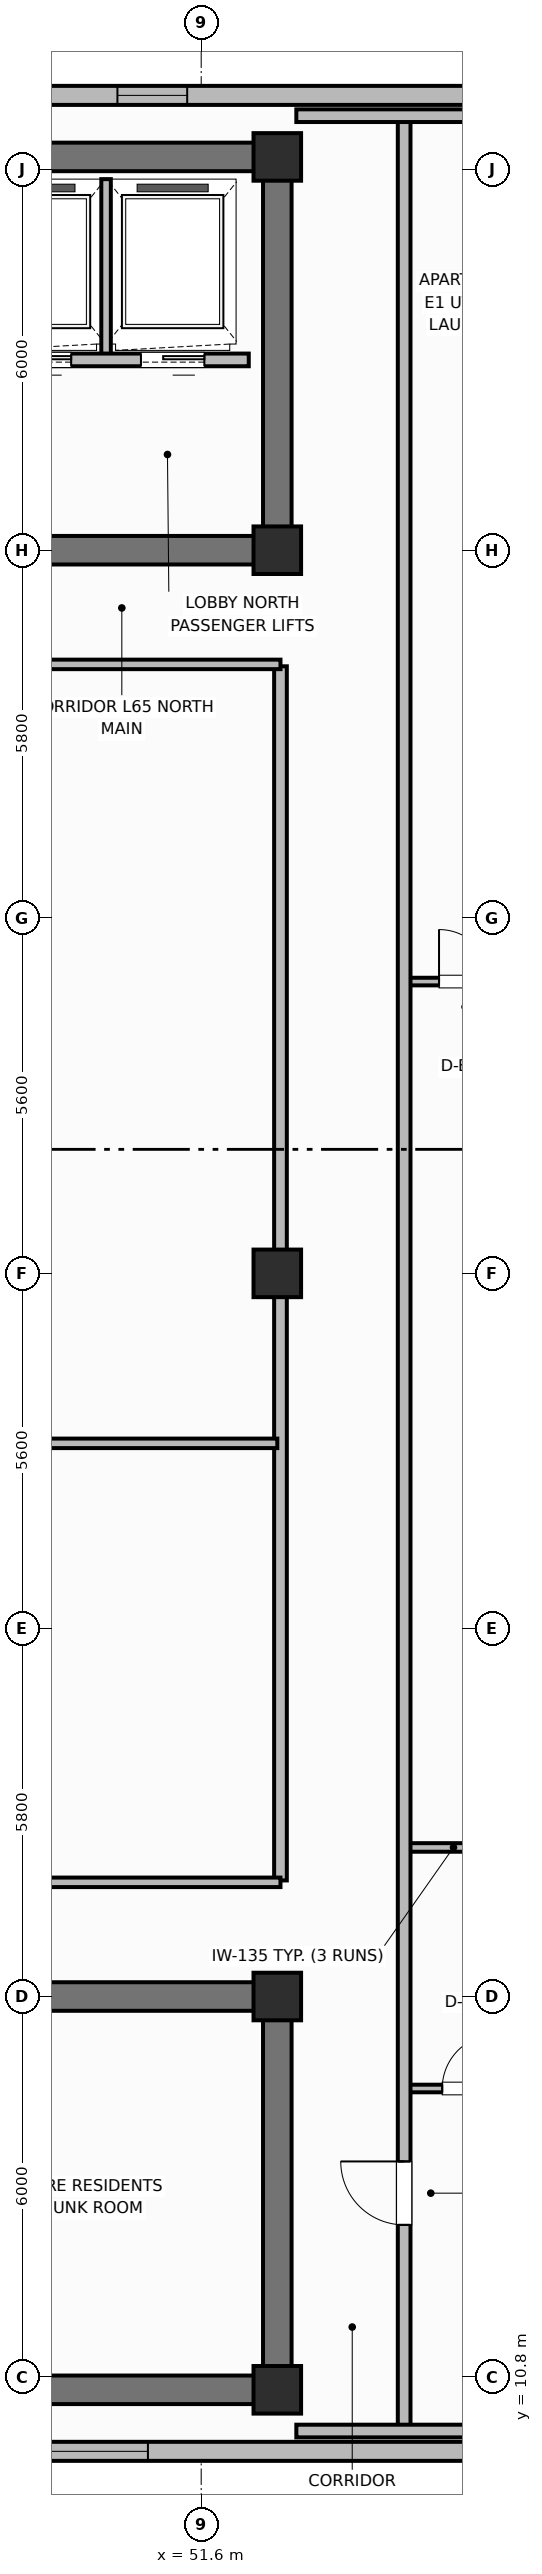
"""IFC4 building model, lengths in metres.
Left out: names, types, materials, properties, quantities, classifications, styles, units other than length and angle.
Written with IfcOpenShell. Run it as: python <this file> out.ifc"""

import sys

from ifc_helpers import new_model, si_unit, direction, frame, frame_2d, origin, origin_2d, place, context, subcontext, project, spatial, rectangle, extrude, element, fill, save


model = new_model("IFC4")
c1 = context("Model", 3, precision=1e-05, world=origin(), true_north=direction((0.0, 1.0)))
c2 = subcontext(c1, "Body", "Model", "MODEL_VIEW")
j1 = project(units=[si_unit("LENGTHUNIT", "METRE"), si_unit("PLANEANGLEUNIT", "RADIAN")], contexts=[c1])
p1 = place(None, origin())
s1 = spatial("IfcSite", under=j1, at=p1, CompositionType="ELEMENT")
p2 = place(p1, origin())
s2 = spatial("IfcBuilding", under=s1, at=p2, CompositionType="ELEMENT")
p3 = place(p2, frame((0.0, 0.0, 260.2)))
s3 = spatial("IfcBuildingStorey", under=s2, at=p3, CompositionType="ELEMENT", Elevation=260.2)
p4 = place(p3, frame((52.8, 10.6, 0.0), z_axis=(0.0, 0.0, 1.0), x_axis=(-1.0, 0.0, 0.0)))
e1 = element("IfcWall", 1, at=p4, inside=s3, PredefinedType="SHEAR", context=c2, shape_type="SweptSolid", body=[
    extrude(rectangle(XDim=27.2, YDim=0.45, at=frame_2d((13.6, 0.0))), origin(), (0.0, 0.0, 1.0), 3.7),
])
p5 = place(p3, frame((52.8, 10.825, 0.0), z_axis=(0.0, 0.0, 1.0), x_axis=(0.0, 1.0, 0.0)))
e2 = element("IfcWall", 2, at=p5, inside=s3, PredefinedType="SHEAR", context=c2, shape_type="SweptSolid", body=[
    extrude(rectangle(XDim=5.75, YDim=0.45, at=frame_2d((2.875, 0.0))), origin(), (0.0, 0.0, 1.0), 3.7),
])
p6 = place(p3, frame((25.6, 16.8, 0.0), z_axis=(0.0, 0.0, 1.0), x_axis=(1.0, 0.0, 0.0)))
e3 = element("IfcWall", 3, at=p6, inside=s3, PredefinedType="SHEAR", context=c2, shape_type="SweptSolid", body=[
    extrude(rectangle(XDim=27.2, YDim=0.45, at=frame_2d((13.6, 0.0))), origin(), (0.0, 0.0, 1.0), 3.7),
])
p7 = place(p6, frame((1.9, 0.0, 0.0)))
e4 = element("IfcOpeningElement", 4, at=p7, cuts=e3, PredefinedType="OPENING", context=c2, shape_type="SweptSolid", body=[
    extrude(rectangle(XDim=1.1, YDim=2.15, at=frame_2d((0.55, 1.075))), frame((0.0, 0.235, 0.0), z_axis=(0.0, -1.0, 0.0), x_axis=(1.0, 0.0, 0.0)), (0.0, 0.0, 1.0), 0.47),
])
p8 = place(p6, frame((13.0, 0.0, 0.0)))
e5 = element("IfcOpeningElement", 5, at=p8, cuts=e3, PredefinedType="OPENING", context=c2, shape_type="SweptSolid", body=[
    extrude(rectangle(XDim=1.2, YDim=2.15, at=frame_2d((0.6, 1.075))), frame((0.0, 0.235, 0.0), z_axis=(0.0, -1.0, 0.0), x_axis=(1.0, 0.0, 0.0)), (0.0, 0.0, 1.0), 0.47),
])
p9 = place(p6, frame((21.6, 0.0, 0.0)))
e6 = element("IfcOpeningElement", 6, at=p9, cuts=e3, PredefinedType="OPENING", context=c2, shape_type="SweptSolid", body=[
    extrude(rectangle(XDim=1.0, YDim=2.15, at=frame_2d((0.5, 1.075))), frame((0.0, 0.235, 0.0), z_axis=(0.0, -1.0, 0.0), x_axis=(1.0, 0.0, 0.0)), (0.0, 0.0, 1.0), 0.47),
])
p10 = place(p3, frame((25.6, 45.8, 0.0), z_axis=(0.0, 0.0, 1.0), x_axis=(1.0, 0.0, 0.0)))
e7 = element("IfcWall", 7, at=p10, inside=s3, PredefinedType="SHEAR", context=c2, shape_type="SweptSolid", body=[
    extrude(rectangle(XDim=27.2, YDim=0.45, at=frame_2d((13.6, 0.0))), origin(), (0.0, 0.0, 1.0), 3.7),
])
p11 = place(p3, frame((52.8, 39.825, 0.0), z_axis=(0.0, 0.0, 1.0), x_axis=(0.0, 1.0, 0.0)))
e8 = element("IfcWall", 8, at=p11, inside=s3, PredefinedType="SHEAR", context=c2, shape_type="SweptSolid", body=[
    extrude(rectangle(XDim=5.75, YDim=0.45, at=frame_2d((2.875, 0.0))), origin(), (0.0, 0.0, 1.0), 3.7),
])
p12 = place(p3, frame((52.8, 39.6, 0.0), z_axis=(0.0, 0.0, 1.0), x_axis=(-1.0, 0.0, 0.0)))
e9 = element("IfcWall", 9, at=p12, inside=s3, PredefinedType="SHEAR", context=c2, shape_type="SweptSolid", body=[
    extrude(rectangle(XDim=27.2, YDim=0.45, at=frame_2d((13.6, 0.0))), origin(), (0.0, 0.0, 1.0), 3.7),
])
p13 = place(p12, frame((24.2, 0.0, 0.0)))
e10 = element("IfcOpeningElement", 10, at=p13, cuts=e9, PredefinedType="OPENING", context=c2, shape_type="SweptSolid", body=[
    extrude(rectangle(XDim=1.1, YDim=2.15, at=frame_2d((0.55, 1.075))), frame((0.0, 0.235, 0.0), z_axis=(0.0, -1.0, 0.0), x_axis=(1.0, 0.0, 0.0)), (0.0, 0.0, 1.0), 0.47),
])
p14 = place(p12, frame((15.1, 0.0, 0.0)))
e11 = element("IfcOpeningElement", 11, at=p14, cuts=e9, PredefinedType="OPENING", context=c2, shape_type="SweptSolid", body=[
    extrude(rectangle(XDim=1.2, YDim=2.15, at=frame_2d((0.6, 1.075))), frame((0.0, 0.235, 0.0), z_axis=(0.0, -1.0, 0.0), x_axis=(1.0, 0.0, 0.0)), (0.0, 0.0, 1.0), 0.47),
])
p15 = place(p12, frame((11.6, 0.0, 0.0)))
e12 = element("IfcOpeningElement", 12, at=p15, cuts=e9, PredefinedType="OPENING", context=c2, shape_type="SweptSolid", body=[
    extrude(rectangle(XDim=0.9, YDim=2.1, at=frame_2d((0.45, 1.05))), frame((0.0, 0.235, 0.0), z_axis=(0.0, -1.0, 0.0), x_axis=(1.0, 0.0, 0.0)), (0.0, 0.0, 1.0), 0.47),
])
p16 = place(p12, frame((7.35, 0.0, 0.0)))
e13 = element("IfcOpeningElement", 13, at=p16, cuts=e9, PredefinedType="OPENING", context=c2, shape_type="SweptSolid", body=[
    extrude(rectangle(XDim=0.85, YDim=2.1, at=frame_2d((0.425, 1.05))), frame((0.0, 0.235, 0.0), z_axis=(0.0, -1.0, 0.0), x_axis=(1.0, 0.0, 0.0)), (0.0, 0.0, 1.0), 0.47),
])
p17 = place(p12, frame((4.2, 0.0, 0.0)))
e14 = element("IfcOpeningElement", 14, at=p17, cuts=e9, PredefinedType="OPENING", context=c2, shape_type="SweptSolid", body=[
    extrude(rectangle(XDim=1.3, YDim=2.2, at=frame_2d((0.65, 1.1))), frame((0.0, 0.235, 0.0), z_axis=(0.0, -1.0, 0.0), x_axis=(1.0, 0.0, 0.0)), (0.0, 0.0, 1.0), 0.47),
])
for number, where, z_axis, x_axis in (
    (15, (52.8, 10.6, 0.0), (0.0, 0.0, 1.0), (1.0, 0.0, 0.0)),
    (16, (52.8, 16.8, 0.0), (0.0, 0.0, 1.0), (1.0, 0.0, 0.0)),
    (17, (52.8, 39.6, 0.0), (0.0, 0.0, 1.0), (1.0, 0.0, 0.0)),
    (18, (52.8, 45.8, 0.0), (0.0, 0.0, 1.0), (1.0, 0.0, 0.0)),
    (19, (52.8, 28.2, 0.0), (0.0, 0.0, 1.0), (1.0, 0.0, 0.0)),
):
    element("IfcColumn", number, at=place(p3, frame(where, z_axis=z_axis, x_axis=x_axis)), inside=s3, PredefinedType="COLUMN", context=c2, shape_type="SweptSolid", body=[
        extrude(rectangle(XDim=0.75, YDim=0.75, at=origin_2d()), origin(), (0.0, 0.0, 1.0), 3.7),
    ])
p18 = place(p3, frame((22.56, 9.63, 0.0), z_axis=(0.0, 0.0, 1.0), x_axis=(1.0, 0.0, 0.0)))
e20 = element("IfcWall", 20, at=p18, inside=s3, PredefinedType="SOLIDWALL", context=c2, shape_type="SweptSolid", body=[
    extrude(rectangle(XDim=33.28, YDim=0.3, at=frame_2d((16.64, 0.0))), origin(), (0.0, 0.0, 1.0), 2.73),
])
p19 = place(p18, frame((5.08, 0.0, 0.76)))
e21 = element("IfcOpeningElement", 21, at=p19, cuts=e20, PredefinedType="OPENING", context=c2, shape_type="SweptSolid", body=[
    extrude(rectangle(XDim=1.8, YDim=1.85, at=frame_2d((0.9, 0.925))), frame((0.0, 0.16, 0.0), z_axis=(0.0, -1.0, 0.0), x_axis=(1.0, 0.0, 0.0)), (0.0, 0.0, 1.0), 0.32),
])
p20 = place(p18, frame((8.633, 0.0, 0.76)))
e22 = element("IfcOpeningElement", 22, at=p20, cuts=e20, PredefinedType="OPENING", context=c2, shape_type="SweptSolid", body=[
    extrude(rectangle(XDim=1.8, YDim=1.85, at=frame_2d((0.9, 0.925))), frame((0.0, 0.16, 0.0), z_axis=(0.0, -1.0, 0.0), x_axis=(1.0, 0.0, 0.0)), (0.0, 0.0, 1.0), 0.32),
])
p21 = place(p18, frame((15.74, 0.0, 0.76)))
e23 = element("IfcOpeningElement", 23, at=p21, cuts=e20, PredefinedType="OPENING", context=c2, shape_type="SweptSolid", body=[
    extrude(rectangle(XDim=1.8, YDim=1.85, at=frame_2d((0.9, 0.925))), frame((0.0, 0.16, 0.0), z_axis=(0.0, -1.0, 0.0), x_axis=(1.0, 0.0, 0.0)), (0.0, 0.0, 1.0), 0.32),
])
p22 = place(p18, frame((22.847, 0.0, 0.76)))
e24 = element("IfcOpeningElement", 24, at=p22, cuts=e20, PredefinedType="OPENING", context=c2, shape_type="SweptSolid", body=[
    extrude(rectangle(XDim=1.8, YDim=1.85, at=frame_2d((0.9, 0.925))), frame((0.0, 0.16, 0.0), z_axis=(0.0, -1.0, 0.0), x_axis=(1.0, 0.0, 0.0)), (0.0, 0.0, 1.0), 0.32),
])
p23 = place(p18, frame((26.4, 0.0, 0.76)))
e25 = element("IfcOpeningElement", 25, at=p23, cuts=e20, PredefinedType="OPENING", context=c2, shape_type="SweptSolid", body=[
    extrude(rectangle(XDim=1.8, YDim=1.85, at=frame_2d((0.9, 0.925))), frame((0.0, 0.16, 0.0), z_axis=(0.0, -1.0, 0.0), x_axis=(1.0, 0.0, 0.0)), (0.0, 0.0, 1.0), 0.32),
])
p24 = place(p3, frame((55.84, 46.77, 0.0), z_axis=(0.0, 0.0, 1.0), x_axis=(-1.0, 0.0, 0.0)))
e26 = element("IfcWall", 26, at=p24, inside=s3, PredefinedType="SOLIDWALL", context=c2, shape_type="SweptSolid", body=[
    extrude(rectangle(XDim=33.28, YDim=0.3, at=frame_2d((16.64, 0.0))), origin(), (0.0, 0.0, 1.0), 2.73),
])
p25 = place(p24, frame((4.461, 0.0, 0.95)))
e27 = element("IfcOpeningElement", 27, at=p25, cuts=e26, PredefinedType="OPENING", context=c2, shape_type="SweptSolid", body=[
    extrude(rectangle(XDim=1.1, YDim=1.65, at=frame_2d((0.55, 0.825))), frame((0.0, 0.16, 0.0), z_axis=(0.0, -1.0, 0.0), x_axis=(1.0, 0.0, 0.0)), (0.0, 0.0, 1.0), 0.32),
])
p26 = place(p24, frame((7.368, 0.0, 0.95)))
e28 = element("IfcOpeningElement", 28, at=p26, cuts=e26, PredefinedType="OPENING", context=c2, shape_type="SweptSolid", body=[
    extrude(rectangle(XDim=1.1, YDim=1.65, at=frame_2d((0.55, 0.825))), frame((0.0, 0.16, 0.0), z_axis=(0.0, -1.0, 0.0), x_axis=(1.0, 0.0, 0.0)), (0.0, 0.0, 1.0), 0.32),
])
p27 = place(p24, frame((10.275, 0.0, 0.95)))
e29 = element("IfcOpeningElement", 29, at=p27, cuts=e26, PredefinedType="OPENING", context=c2, shape_type="SweptSolid", body=[
    extrude(rectangle(XDim=1.1, YDim=1.65, at=frame_2d((0.55, 0.825))), frame((0.0, 0.16, 0.0), z_axis=(0.0, -1.0, 0.0), x_axis=(1.0, 0.0, 0.0)), (0.0, 0.0, 1.0), 0.32),
])
p28 = place(p24, frame((13.883, 0.0, 0.95)))
e30 = element("IfcOpeningElement", 30, at=p28, cuts=e26, PredefinedType="OPENING", context=c2, shape_type="SweptSolid", body=[
    extrude(rectangle(XDim=1.1, YDim=1.65, at=frame_2d((0.55, 0.825))), frame((0.0, 0.16, 0.0), z_axis=(0.0, -1.0, 0.0), x_axis=(1.0, 0.0, 0.0)), (0.0, 0.0, 1.0), 0.32),
])
p29 = place(p24, frame((16.09, 0.0, 0.95)))
e31 = element("IfcOpeningElement", 31, at=p29, cuts=e26, PredefinedType="OPENING", context=c2, shape_type="SweptSolid", body=[
    extrude(rectangle(XDim=1.1, YDim=1.65, at=frame_2d((0.55, 0.825))), frame((0.0, 0.16, 0.0), z_axis=(0.0, -1.0, 0.0), x_axis=(1.0, 0.0, 0.0)), (0.0, 0.0, 1.0), 0.32),
])
p30 = place(p24, frame((18.297, 0.0, 0.95)))
e32 = element("IfcOpeningElement", 32, at=p30, cuts=e26, PredefinedType="OPENING", context=c2, shape_type="SweptSolid", body=[
    extrude(rectangle(XDim=1.1, YDim=1.65, at=frame_2d((0.55, 0.825))), frame((0.0, 0.16, 0.0), z_axis=(0.0, -1.0, 0.0), x_axis=(1.0, 0.0, 0.0)), (0.0, 0.0, 1.0), 0.32),
])
p31 = place(p24, frame((21.905, 0.0, 0.95)))
e33 = element("IfcOpeningElement", 33, at=p31, cuts=e26, PredefinedType="OPENING", context=c2, shape_type="SweptSolid", body=[
    extrude(rectangle(XDim=1.1, YDim=1.65, at=frame_2d((0.55, 0.825))), frame((0.0, 0.16, 0.0), z_axis=(0.0, -1.0, 0.0), x_axis=(1.0, 0.0, 0.0)), (0.0, 0.0, 1.0), 0.32),
])
p32 = place(p24, frame((24.812, 0.0, 0.95)))
e34 = element("IfcOpeningElement", 34, at=p32, cuts=e26, PredefinedType="OPENING", context=c2, shape_type="SweptSolid", body=[
    extrude(rectangle(XDim=1.1, YDim=1.65, at=frame_2d((0.55, 0.825))), frame((0.0, 0.16, 0.0), z_axis=(0.0, -1.0, 0.0), x_axis=(1.0, 0.0, 0.0)), (0.0, 0.0, 1.0), 0.32),
])
p33 = place(p24, frame((27.719, 0.0, 0.95)))
e35 = element("IfcOpeningElement", 35, at=p33, cuts=e26, PredefinedType="OPENING", context=c2, shape_type="SweptSolid", body=[
    extrude(rectangle(XDim=1.1, YDim=1.65, at=frame_2d((0.55, 0.825))), frame((0.0, 0.16, 0.0), z_axis=(0.0, -1.0, 0.0), x_axis=(1.0, 0.0, 0.0)), (0.0, 0.0, 1.0), 0.32),
])
p34 = place(p3, frame((50.1, 42.65, 0.0), z_axis=(0.0, 0.0, 1.0), x_axis=(0.0, 1.0, 0.0)))
e36 = element("IfcWall", 36, at=p34, inside=s3, PredefinedType="PARTITIONING", context=c2, shape_type="SweptSolid", body=[
    extrude(rectangle(XDim=2.8, YDim=0.15, at=frame_2d((1.4, 0.0))), origin(), (0.0, 0.0, 1.0), 2.56),
])
p35 = place(p3, frame((52.35, 42.6, 0.0), z_axis=(0.0, 0.0, 1.0), x_axis=(-1.0, 0.0, 0.0)))
e37 = element("IfcWall", 37, at=p35, inside=s3, PredefinedType="PARTITIONING", context=c2, shape_type="SweptSolid", body=[
    extrude(rectangle(XDim=6.5, YDim=0.2, at=frame_2d((3.25, 0.0))), origin(), (0.0, 0.0, 1.0), 2.56),
])
p36 = place(p35, frame((4.9, 0.0, 0.0)))
e38 = element("IfcOpeningElement", 38, at=p36, cuts=e37, PredefinedType="OPENING", context=c2, shape_type="SweptSolid", body=[
    extrude(rectangle(XDim=1.0, YDim=2.15, at=frame_2d((0.5, 1.075))), frame((0.0, 0.11, 0.0), z_axis=(0.0, -1.0, 0.0), x_axis=(1.0, 0.0, 0.0)), (0.0, 0.0, 1.0), 0.22),
])
p37 = place(p35, frame((2.8, 0.0, 0.0)))
e39 = element("IfcOpeningElement", 39, at=p37, cuts=e37, PredefinedType="OPENING", context=c2, shape_type="SweptSolid", body=[
    extrude(rectangle(XDim=1.0, YDim=2.15, at=frame_2d((0.5, 1.075))), frame((0.0, 0.11, 0.0), z_axis=(0.0, -1.0, 0.0), x_axis=(1.0, 0.0, 0.0)), (0.0, 0.0, 1.0), 0.22),
])
p38 = place(p35, frame((0.7, 0.0, 0.0)))
e40 = element("IfcOpeningElement", 40, at=p38, cuts=e37, PredefinedType="OPENING", context=c2, shape_type="SweptSolid", body=[
    extrude(rectangle(XDim=1.0, YDim=2.15, at=frame_2d((0.5, 1.075))), frame((0.0, 0.11, 0.0), z_axis=(0.0, -1.0, 0.0), x_axis=(1.0, 0.0, 0.0)), (0.0, 0.0, 1.0), 0.22),
])
p39 = place(p3, frame((52.85, 18.63, 0.0), z_axis=(0.0, 0.0, 1.0), x_axis=(0.0, 1.0, 0.0)))
e41 = element("IfcWall", 41, at=p39, inside=s3, PredefinedType="PARTITIONING", context=c2, shape_type="SweptSolid", body=[
    extrude(rectangle(XDim=19.14, YDim=0.2, at=frame_2d((9.57, 0.0))), origin(), (0.0, 0.0, 1.0), 2.56),
])
for number, where, z_axis, x_axis in (
    (42, (29.9, 18.6, 0.0), (0.0, 0.0, 1.0), (1.0, 0.0, 0.0)),
    (43, (29.9, 37.8, 0.0), (0.0, 0.0, 1.0), (1.0, 0.0, 0.0)),
):
    element("IfcWall", number, at=place(p3, frame(where, z_axis=z_axis, x_axis=x_axis)), inside=s3, PredefinedType="PARTITIONING", context=c2, shape_type="SweptSolid", body=[
        extrude(rectangle(XDim=22.95, YDim=0.15, at=frame_2d((11.475, 0.0))), origin(), (0.0, 0.0, 1.0), 2.56),
    ])
p40 = place(p3, frame((29.93, 25.521, 0.0), z_axis=(0.0, 0.0, 1.0), x_axis=(1.0, 0.0, 0.0)))
e44 = element("IfcWall", 44, at=p40, inside=s3, PredefinedType="PARTITIONING", context=c2, shape_type="SweptSolid", body=[
    extrude(rectangle(XDim=22.87, YDim=0.15, at=frame_2d((11.435, 0.0))), origin(), (0.0, 0.0, 1.0), 2.56),
])
p41 = place(p3, frame((54.8, 15.35, 0.0), z_axis=(0.0, 0.0, 1.0), x_axis=(1.0, 0.0, 0.0)))
e45 = element("IfcWall", 45, at=p41, inside=s3, PredefinedType="PARTITIONING", context=c2, shape_type="SweptSolid", body=[
    extrude(rectangle(XDim=1.95, YDim=0.12, at=frame_2d((0.975, 0.0))), origin(), (0.0, 0.0, 1.0), 2.56),
])
p42 = place(p41, frame((0.6, 0.0, 0.0)))
e46 = element("IfcOpeningElement", 46, at=p42, cuts=e45, PredefinedType="OPENING", context=c2, shape_type="SweptSolid", body=[
    extrude(rectangle(XDim=0.85, YDim=2.1, at=frame_2d((0.425, 1.05))), frame((0.0, 0.07, 0.0), z_axis=(0.0, -1.0, 0.0), x_axis=(1.0, 0.0, 0.0)), (0.0, 0.0, 1.0), 0.14),
])
p43 = place(p3, frame((54.8, 19.15, 0.0), z_axis=(0.0, 0.0, 1.0), x_axis=(1.0, 0.0, 0.0)))
e47 = element("IfcWall", 47, at=p43, inside=s3, PredefinedType="PARTITIONING", context=c2, shape_type="SweptSolid", body=[
    extrude(rectangle(XDim=1.95, YDim=0.135, at=frame_2d((0.975, 0.0))), origin(), (0.0, 0.0, 1.0), 2.56),
])
p44 = place(p3, frame((54.8, 32.8, 0.0), z_axis=(0.0, 0.0, 1.0), x_axis=(1.0, 0.0, 0.0)))
e48 = element("IfcWall", 48, at=p44, inside=s3, PredefinedType="PARTITIONING", context=c2, shape_type="SweptSolid", body=[
    extrude(rectangle(XDim=1.95, YDim=0.12, at=frame_2d((0.975, 0.0))), origin(), (0.0, 0.0, 1.0), 2.56),
])
p45 = place(p44, frame((0.55, 0.0, 0.0)))
e49 = element("IfcOpeningElement", 49, at=p45, cuts=e48, PredefinedType="OPENING", context=c2, shape_type="SweptSolid", body=[
    extrude(rectangle(XDim=0.82, YDim=2.08, at=frame_2d((0.41, 1.04))), frame((0.0, 0.07, 0.0), z_axis=(0.0, -1.0, 0.0), x_axis=(1.0, 0.0, 0.0)), (0.0, 0.0, 1.0), 0.14),
])
p46 = place(p3, frame((54.8, 9.95, 0.0), z_axis=(0.0, 0.0, 1.0), x_axis=(0.0, 1.0, 0.0)))
e50 = element("IfcWall", 50, at=p46, inside=s3, PredefinedType="PARTITIONING", context=c2, shape_type="SweptSolid", body=[
    extrude(rectangle(XDim=36.5, YDim=0.2, at=frame_2d((18.25, 0.0))), origin(), (0.0, 0.0, 1.0), 2.56),
])
p47 = place(p46, frame((3.25, 0.0, 0.0)))
e51 = element("IfcOpeningElement", 51, at=p47, cuts=e50, PredefinedType="OPENING", context=c2, shape_type="SweptSolid", body=[
    extrude(rectangle(XDim=1.0, YDim=2.15, at=frame_2d((0.5, 1.075))), frame((0.0, 0.11, 0.0), z_axis=(0.0, -1.0, 0.0), x_axis=(1.0, 0.0, 0.0)), (0.0, 0.0, 1.0), 0.22),
])
for number, where, z_axis, x_axis in (
    (52, (53.1, 9.95, 0.0), (0.0, 0.0, 1.0), (1.0, 0.0, 0.0)),
    (53, (53.1, 46.45, 0.0), (0.0, 0.0, 1.0), (1.0, 0.0, 0.0)),
):
    element("IfcWall", number, at=place(p3, frame(where, z_axis=z_axis, x_axis=x_axis)), inside=s3, PredefinedType="PARTITIONING", context=c2, shape_type="SweptSolid", body=[
        extrude(rectangle(XDim=3.754, YDim=0.2, at=frame_2d((1.877, 0.0))), origin(), (0.0, 0.0, 1.0), 2.56),
    ])
p48 = place(p23, origin())
e54 = element("IfcWindow", 54, at=p48, inside=s3, PartitioningType="SINGLE_PANEL", PredefinedType="WINDOW", context=c2, shape_type="SweptSolid", body=[
    extrude(rectangle(XDim=1.8, YDim=1.85, at=frame_2d((0.9, 0.925))), frame((0.0, 0.03, 0.0), z_axis=(0.0, -1.0, 0.0), x_axis=(1.0, 0.0, 0.0)), (0.0, 0.0, 1.0), 0.06),
])
fill(e25, e54)
p49 = place(p25, origin())
e55 = element("IfcWindow", 55, at=p49, inside=s3, PartitioningType="SINGLE_PANEL", PredefinedType="WINDOW", context=c2, shape_type="SweptSolid", body=[
    extrude(rectangle(XDim=1.1, YDim=1.65, at=frame_2d((0.55, 0.825))), frame((0.0, 0.03, 0.0), z_axis=(0.0, -1.0, 0.0), x_axis=(1.0, 0.0, 0.0)), (0.0, 0.0, 1.0), 0.06),
])
fill(e27, e55)
p50 = place(p37, origin())
e56 = element("IfcDoor", 56, at=p50, inside=s3, OperationType="SLIDING_TO_LEFT", PredefinedType="DOOR", context=c2, shape_type="SweptSolid", body=[
    extrude(rectangle(XDim=1.0, YDim=2.15, at=frame_2d((0.5, 1.075))), frame((0.0, 0.025, 0.0), z_axis=(0.0, -1.0, 0.0), x_axis=(1.0, 0.0, 0.0)), (0.0, 0.0, 1.0), 0.05),
])
fill(e39, e56)
p51 = place(p38, origin())
e57 = element("IfcDoor", 57, at=p51, inside=s3, OperationType="SLIDING_TO_LEFT", PredefinedType="DOOR", context=c2, shape_type="SweptSolid", body=[
    extrude(rectangle(XDim=1.0, YDim=2.15, at=frame_2d((0.5, 1.075))), frame((0.0, 0.025, 0.0), z_axis=(0.0, -1.0, 0.0), x_axis=(1.0, 0.0, 0.0)), (0.0, 0.0, 1.0), 0.05),
])
fill(e40, e57)
p52 = place(p42, origin())
e58 = element("IfcDoor", 58, at=p52, inside=s3, OperationType="SINGLE_SWING_RIGHT", PredefinedType="DOOR", context=c2, shape_type="SweptSolid", body=[
    extrude(rectangle(XDim=0.85, YDim=2.1, at=frame_2d((0.425, 1.05))), frame((0.0, 0.025, 0.0), z_axis=(0.0, -1.0, 0.0), x_axis=(1.0, 0.0, 0.0)), (0.0, 0.0, 1.0), 0.05),
])
fill(e46, e58)
p53 = place(p45, origin())
e59 = element("IfcDoor", 59, at=p53, inside=s3, OperationType="SINGLE_SWING_LEFT", PredefinedType="DOOR", context=c2, shape_type="SweptSolid", body=[
    extrude(rectangle(XDim=0.82, YDim=2.08, at=frame_2d((0.41, 1.04))), frame((0.0, 0.025, 0.0), z_axis=(0.0, -1.0, 0.0), x_axis=(1.0, 0.0, 0.0)), (0.0, 0.0, 1.0), 0.05),
])
fill(e49, e59)
p54 = place(p47, origin())
e60 = element("IfcDoor", 60, at=p54, inside=s3, OperationType="SINGLE_SWING_RIGHT", PredefinedType="DOOR", context=c2, shape_type="SweptSolid", body=[
    extrude(rectangle(XDim=1.0, YDim=2.15, at=frame_2d((0.5, 1.075))), frame((0.0, 0.025, 0.0), z_axis=(0.0, -1.0, 0.0), x_axis=(1.0, 0.0, 0.0)), (0.0, 0.0, 1.0), 0.05),
])
fill(e51, e60)
save(model, sys.argv[1])
